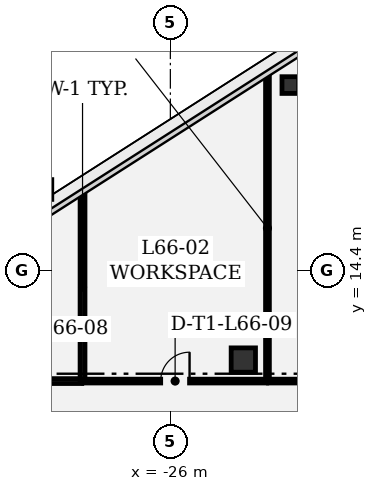
"""IFC4 building model, lengths in metres.
Left out: names, types, materials, properties, quantities, classifications, styles, units other than length and angle.
Written with IfcOpenShell. Run it as: python <this file> out.ifc"""

import sys

from ifc_helpers import new_model, si_unit, direction, frame, frame_2d, origin, origin_2d, place, context, subcontext, project, spatial, rectangle, extrude, element, fill, save


model = new_model("IFC4")
c1 = context("Model", 3, precision=1e-05, world=origin(), true_north=direction((0.0, 1.0)))
c2 = subcontext(c1, "Body", "Model", "MODEL_VIEW")
j1 = project(units=[si_unit("LENGTHUNIT", "METRE"), si_unit("PLANEANGLEUNIT", "RADIAN")], contexts=[c1])
p1 = place(None, origin())
s1 = spatial("IfcSite", under=j1, at=p1, CompositionType="ELEMENT")
p2 = place(p1, origin())
s2 = spatial("IfcBuilding", under=s1, at=p2, CompositionType="ELEMENT")
p3 = place(p2, frame((0.0, 0.0, 285.0)))
s3 = spatial("IfcBuildingStorey", under=s2, at=p3, CompositionType="ELEMENT", Elevation=285.0)
p4 = place(p3, frame((-23.6, 11.45, 0.0), z_axis=(0.0, 0.0, 1.0), x_axis=(1.0, 0.0, 0.0)))
e1 = element("IfcColumn", 1, at=p4, inside=s3, PredefinedType="COLUMN", context=c2, shape_type="SweptSolid", body=[
    extrude(rectangle(XDim=0.8, YDim=0.8, at=origin_2d()), origin(), (0.0, 0.0, 1.0), 4.2),
])
p5 = place(p3, frame((-22.053, 20.495, 0.0), z_axis=(0.0, 0.0, 1.0), x_axis=(1.0, 0.0, 0.0)))
e2 = element("IfcColumn", 2, at=p5, inside=s3, PredefinedType="COLUMN", context=c2, shape_type="SweptSolid", body=[
    extrude(rectangle(XDim=0.55, YDim=0.55, at=origin_2d()), origin(), (0.0, 0.0, 1.0), 4.2),
])
p6 = place(p3, frame((-34.625, 10.758, 0.0), z_axis=(0.0, 0.0, 1.0), x_axis=(1.0, 0.0, 0.0)))
e3 = element("IfcWall", 3, at=p6, inside=s3, PredefinedType="PARTITIONING", context=c2, shape_type="SweptSolid", body=[
    extrude(rectangle(XDim=5.712, YDim=0.16, at=frame_2d((2.856, 0.0))), origin(), (0.0, 0.0, 1.0), 3.13),
])
p7 = place(p6, frame((2.306, 0.0, 0.0)))
e4 = element("IfcOpeningElement", 4, at=p7, cuts=e3, PredefinedType="OPENING", context=c2, shape_type="SweptSolid", body=[
    extrude(rectangle(XDim=1.1, YDim=2.15, at=frame_2d((0.55, 1.075))), frame((0.0, 0.09, 0.0), z_axis=(0.0, -1.0, 0.0), x_axis=(1.0, 0.0, 0.0)), (0.0, 0.0, 1.0), 0.18),
])
p8 = place(p3, frame((-28.888, 10.783, 0.0), z_axis=(0.0, 0.0, 1.0), x_axis=(0.0, 1.0, 0.0)))
e5 = element("IfcWall", 5, at=p8, inside=s3, PredefinedType="PARTITIONING", context=c2, shape_type="SweptSolid", body=[
    extrude(rectangle(XDim=6.122, YDim=0.16, at=frame_2d((3.061, 0.0))), origin(), (0.0, 0.0, 1.0), 3.91),
])
p9 = place(p3, frame((-28.855, 10.758, 0.0), z_axis=(0.0, 0.0, 1.0), x_axis=(1.0, 0.0, 0.0)))
e6 = element("IfcWall", 6, at=p9, inside=s3, PredefinedType="PARTITIONING", context=c2, shape_type="SweptSolid", body=[
    extrude(rectangle(XDim=6.025, YDim=0.125, at=frame_2d((3.012, 0.0))), origin(), (0.0, 0.0, 1.0), 3.13),
])
p10 = place(p9, frame((2.537, 0.0, 0.0)))
e7 = element("IfcOpeningElement", 7, at=p10, cuts=e6, PredefinedType="OPENING", context=c2, shape_type="SweptSolid", body=[
    extrude(rectangle(XDim=0.95, YDim=2.15, at=frame_2d((0.475, 1.075))), frame((0.0, 0.073, 0.0), z_axis=(0.0, -1.0, 0.0), x_axis=(1.0, 0.0, 0.0)), (0.0, 0.0, 1.0), 0.145),
])
p11 = place(p3, frame((-22.806, 10.783, 0.0), z_axis=(0.0, 0.0, 1.0), x_axis=(0.0, 1.0, 0.0)))
e8 = element("IfcWall", 8, at=p11, inside=s3, PredefinedType="PARTITIONING", context=c2, shape_type="SweptSolid", body=[
    extrude(rectangle(XDim=10.009, YDim=0.125, at=frame_2d((5.004, 0.0))), origin(), (0.0, 0.0, 1.0), 3.91),
])
p12 = place(p3, frame((-22.773, 10.758, 0.0), z_axis=(0.0, 0.0, 1.0), x_axis=(1.0, 0.0, 0.0)))
e9 = element("IfcWall", 9, at=p12, inside=s3, PredefinedType="PARTITIONING", context=c2, shape_type="SweptSolid", body=[
    extrude(rectangle(XDim=4.931, YDim=0.125, at=frame_2d((2.465, 0.0))), origin(), (0.0, 0.0, 1.0), 3.529),
])
p13 = place(p12, frame((1.99, 0.0, 0.0)))
e10 = element("IfcOpeningElement", 10, at=p13, cuts=e9, PredefinedType="OPENING", context=c2, shape_type="SweptSolid", body=[
    extrude(rectangle(XDim=0.95, YDim=2.15, at=frame_2d((0.475, 1.075))), frame((0.0, 0.073, 0.0), z_axis=(0.0, -1.0, 0.0), x_axis=(1.0, 0.0, 0.0)), (0.0, 0.0, 1.0), 0.145),
])
p14 = place(p10, origin())
e11 = element("IfcDoor", 11, at=p14, inside=s3, OperationType="SINGLE_SWING_RIGHT", PredefinedType="DOOR", context=c2, shape_type="SweptSolid", body=[
    extrude(rectangle(XDim=0.95, YDim=2.15, at=frame_2d((0.475, 1.075))), frame((0.0, 0.025, 0.0), z_axis=(0.0, -1.0, 0.0), x_axis=(1.0, 0.0, 0.0)), (0.0, 0.0, 1.0), 0.05),
])
fill(e7, e11)
save(model, sys.argv[1])
